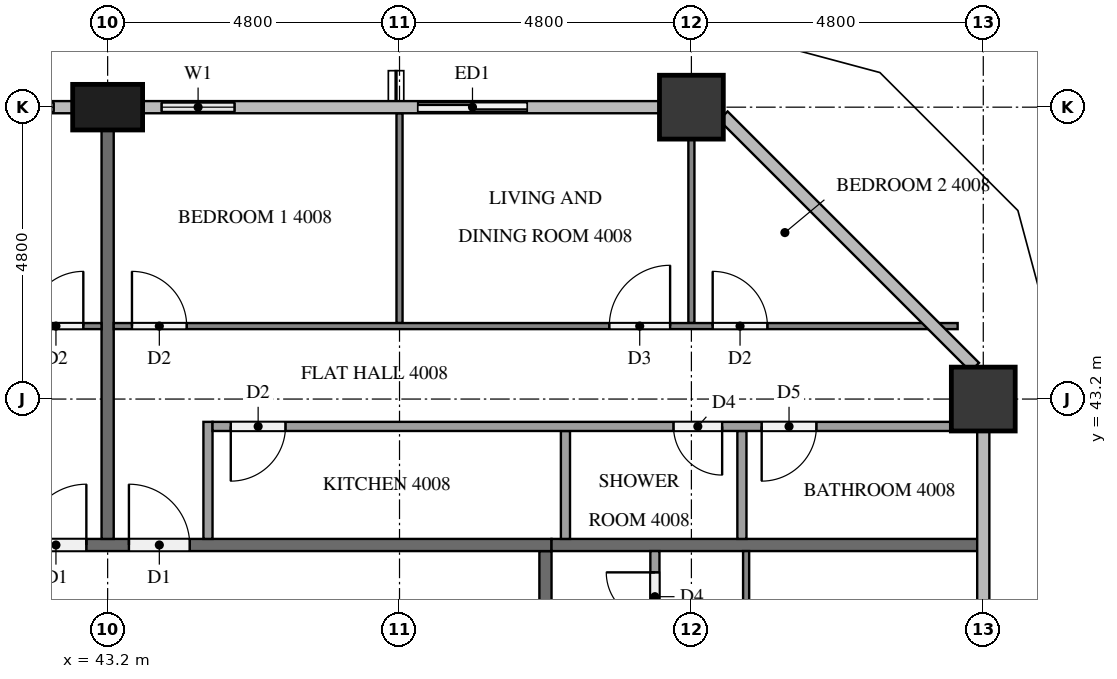
"""IFC4 building model, lengths in metres.
Left out: names, types, materials, properties, quantities, classifications, styles, units other than length and angle.
Written with IfcOpenShell. Run it as: python <this file> out.ifc"""

import sys

from ifc_helpers import new_model, si_unit, direction, frame, frame_2d, origin, origin_2d, place, context, subcontext, project, spatial, rectangle, extrude, element, fill, save


model = new_model("IFC4")
c1 = context("Model", 3, precision=1e-05, world=origin(), true_north=direction((0.0, 1.0)))
c2 = subcontext(c1, "Body", "Model", "MODEL_VIEW")
j1 = project(units=[si_unit("LENGTHUNIT", "METRE"), si_unit("PLANEANGLEUNIT", "RADIAN")], contexts=[c1])
p1 = place(None, origin())
s1 = spatial("IfcSite", under=j1, at=p1, CompositionType="ELEMENT")
p2 = place(p1, origin())
s2 = spatial("IfcBuilding", under=s1, at=p2, CompositionType="ELEMENT")
p3 = place(p2, frame((0.0, 0.0, 156.0)))
s3 = spatial("IfcBuildingStorey", under=s2, at=p3, CompositionType="ELEMENT", Elevation=156.0)
for number, where, z_axis, x_axis in (
    (1, (57.6, 43.2, 0.0), (0.0, 0.0, 1.0), (1.0, 0.0, 0.0)),
    (2, (52.8, 48.0, 0.0), (0.0, 0.0, 1.0), (1.0, 0.0, 0.0)),
):
    element("IfcColumn", number, at=place(p3, frame(where, z_axis=z_axis, x_axis=x_axis)), inside=s3, PredefinedType="COLUMN", context=c2, shape_type="SweptSolid", body=[
        extrude(rectangle(XDim=1.05, YDim=1.05, at=origin_2d()), origin(), (0.0, 0.0, 1.0), 3.2),
    ])
p4 = place(p3, frame((43.2, 48.0, 0.0), z_axis=(0.0, 0.0, 1.0), x_axis=(1.0, 0.0, 0.0)))
e3 = element("IfcColumn", 3, at=p4, inside=s3, PredefinedType="COLUMN", context=c2, shape_type="SweptSolid", body=[
    extrude(rectangle(XDim=1.15, YDim=0.75, at=origin_2d()), origin(), (0.0, 0.0, 1.0), 3.2),
])
p5 = place(p3, frame((50.4, 48.0, 0.0), z_axis=(0.0, 0.0, 1.0), x_axis=(-1.0, 0.0, 0.0)))
e4 = element("IfcWall", 4, at=p5, inside=s3, PredefinedType="SOLIDWALL", context=c2, shape_type="SweptSolid", body=[
    extrude(rectangle(XDim=2.4, YDim=0.15, at=frame_2d((1.2, 0.0))), origin(), (0.0, 0.0, 1.0), 3.2),
])
p6 = place(p5, frame((0.3, 0.0, 0.0)))
e5 = element("IfcOpeningElement", 5, at=p6, cuts=e4, PredefinedType="OPENING", context=c2, shape_type="SweptSolid", body=[
    extrude(rectangle(XDim=1.8, YDim=2.4, at=frame_2d((0.9, 1.2))), frame((0.0, 0.085, 0.0), z_axis=(0.0, -1.0, 0.0), x_axis=(1.0, 0.0, 0.0)), (0.0, 0.0, 1.0), 0.17),
])
p7 = place(p3, frame((45.6, 48.0, 0.0), z_axis=(0.0, 0.0, 1.0), x_axis=(-1.0, 0.0, 0.0)))
e6 = element("IfcWall", 6, at=p7, inside=s3, PredefinedType="SOLIDWALL", context=c2, shape_type="SweptSolid", body=[
    extrude(rectangle(XDim=1.825, YDim=0.15, at=frame_2d((0.913, 0.0))), origin(), (0.0, 0.0, 1.0), 3.2),
])
p8 = place(p7, frame((0.312, 0.0, 0.9)))
e7 = element("IfcOpeningElement", 7, at=p8, cuts=e6, PredefinedType="OPENING", context=c2, shape_type="SweptSolid", body=[
    extrude(rectangle(XDim=1.2, YDim=1.4, at=frame_2d((0.6, 0.7))), frame((0.0, 0.085, 0.0), z_axis=(0.0, -1.0, 0.0), x_axis=(1.0, 0.0, 0.0)), (0.0, 0.0, 1.0), 0.17),
])
p9 = place(p3, frame((42.625, 48.0, 0.0), z_axis=(0.0, 0.0, 1.0), x_axis=(-1.0, 0.0, 0.0)))
e8 = element("IfcWall", 8, at=p9, inside=s3, PredefinedType="SOLIDWALL", context=c2, shape_type="SweptSolid", body=[
    extrude(rectangle(XDim=1.825, YDim=0.15, at=frame_2d((0.913, 0.0))), origin(), (0.0, 0.0, 1.0), 3.2),
])
p10 = place(p9, frame((0.312, 0.0, 0.9)))
e9 = element("IfcOpeningElement", 9, at=p10, cuts=e8, PredefinedType="OPENING", context=c2, shape_type="SweptSolid", body=[
    extrude(rectangle(XDim=1.2, YDim=1.4, at=frame_2d((0.6, 0.7))), frame((0.0, 0.085, 0.0), z_axis=(0.0, -1.0, 0.0), x_axis=(1.0, 0.0, 0.0)), (0.0, 0.0, 1.0), 0.17),
])
p11 = place(p3, frame((50.4, 40.7, 0.0), z_axis=(0.0, 0.0, 1.0), x_axis=(0.0, -1.0, 0.0)))
e10 = element("IfcWall", 10, at=p11, inside=s3, PredefinedType="PARTITIONING", context=c2, shape_type="SweptSolid", body=[
    extrude(rectangle(XDim=28.6, YDim=0.2, at=frame_2d((14.3, 0.0))), origin(), (0.0, 0.0, 1.0), 3.2),
])
p12 = place(p11, frame((17.05, 0.0, 0.0)))
e11 = element("IfcOpeningElement", 11, at=p12, cuts=e10, PredefinedType="OPENING", context=c2, shape_type="SweptSolid", body=[
    extrude(rectangle(XDim=1.0, YDim=2.1, at=frame_2d((0.5, 1.05))), frame((0.0, 0.11, 0.0), z_axis=(0.0, -1.0, 0.0), x_axis=(1.0, 0.0, 0.0)), (0.0, 0.0, 1.0), 0.22),
])
p13 = place(p11, frame((15.35, 0.0, 0.0)))
e12 = element("IfcOpeningElement", 12, at=p13, cuts=e10, PredefinedType="OPENING", context=c2, shape_type="SweptSolid", body=[
    extrude(rectangle(XDim=1.0, YDim=2.1, at=frame_2d((0.5, 1.05))), frame((0.0, 0.11, 0.0), z_axis=(0.0, -1.0, 0.0), x_axis=(1.0, 0.0, 0.0)), (0.0, 0.0, 1.0), 0.22),
])
p14 = place(p11, frame((5.75, 0.0, 0.0)))
e13 = element("IfcOpeningElement", 13, at=p14, cuts=e10, PredefinedType="OPENING", context=c2, shape_type="SweptSolid", body=[
    extrude(rectangle(XDim=1.0, YDim=2.1, at=frame_2d((0.5, 1.05))), frame((0.0, 0.11, 0.0), z_axis=(0.0, -1.0, 0.0), x_axis=(1.0, 0.0, 0.0)), (0.0, 0.0, 1.0), 0.22),
])
p15 = place(p3, frame((11.9, 40.8, 0.0), z_axis=(0.0, 0.0, 1.0), x_axis=(1.0, 0.0, 0.0)))
e14 = element("IfcWall", 14, at=p15, inside=s3, PredefinedType="PARTITIONING", context=c2, shape_type="SweptSolid", body=[
    extrude(rectangle(XDim=38.6, YDim=0.2, at=frame_2d((19.3, 0.0))), origin(), (0.0, 0.0, 1.0), 3.2),
])
p16 = place(p15, frame((31.65, 0.0, 0.0)))
e15 = element("IfcOpeningElement", 15, at=p16, cuts=e14, PredefinedType="OPENING", context=c2, shape_type="SweptSolid", body=[
    extrude(rectangle(XDim=1.0, YDim=2.1, at=frame_2d((0.5, 1.05))), frame((0.0, 0.11, 0.0), z_axis=(0.0, -1.0, 0.0), x_axis=(1.0, 0.0, 0.0)), (0.0, 0.0, 1.0), 0.22),
])
p17 = place(p15, frame((29.95, 0.0, 0.0)))
e16 = element("IfcOpeningElement", 16, at=p17, cuts=e14, PredefinedType="OPENING", context=c2, shape_type="SweptSolid", body=[
    extrude(rectangle(XDim=1.0, YDim=2.1, at=frame_2d((0.5, 1.05))), frame((0.0, 0.11, 0.0), z_axis=(0.0, -1.0, 0.0), x_axis=(1.0, 0.0, 0.0)), (0.0, 0.0, 1.0), 0.22),
])
p18 = place(p15, frame((15.55, 0.0, 0.0)))
e17 = element("IfcOpeningElement", 17, at=p18, cuts=e14, PredefinedType="OPENING", context=c2, shape_type="SweptSolid", body=[
    extrude(rectangle(XDim=1.0, YDim=2.1, at=frame_2d((0.5, 1.05))), frame((0.0, 0.11, 0.0), z_axis=(0.0, -1.0, 0.0), x_axis=(1.0, 0.0, 0.0)), (0.0, 0.0, 1.0), 0.22),
])
p19 = place(p15, frame((1.15, 0.0, 0.0)))
e18 = element("IfcOpeningElement", 18, at=p19, cuts=e14, PredefinedType="OPENING", context=c2, shape_type="SweptSolid", body=[
    extrude(rectangle(XDim=1.0, YDim=2.1, at=frame_2d((0.5, 1.05))), frame((0.0, 0.11, 0.0), z_axis=(0.0, -1.0, 0.0), x_axis=(1.0, 0.0, 0.0)), (0.0, 0.0, 1.0), 0.22),
])
p20 = place(p3, frame((50.5, 40.8, 0.0), z_axis=(0.0, 0.0, 1.0), x_axis=(1.0, 0.0, 0.0)))
e19 = element("IfcWall", 19, at=p20, inside=s3, PredefinedType="PARTITIONING", context=c2, shape_type="SweptSolid", body=[
    extrude(rectangle(XDim=7.0, YDim=0.2, at=frame_2d((3.5, 0.0))), origin(), (0.0, 0.0, 1.0), 3.2),
])
p21 = place(p3, frame((43.2, 47.625, 0.0), z_axis=(0.0, 0.0, 1.0), x_axis=(0.0, -1.0, 0.0)))
e20 = element("IfcWall", 20, at=p21, inside=s3, PredefinedType="PARTITIONING", context=c2, shape_type="SweptSolid", body=[
    extrude(rectangle(XDim=6.725, YDim=0.2, at=frame_2d((3.363, 0.0))), origin(), (0.0, 0.0, 1.0), 3.2),
])
p22 = place(p3, frame((53.7, 40.7, 0.0), z_axis=(0.0, 0.0, 1.0), x_axis=(0.0, -1.0, 0.0)))
e21 = element("IfcWall", 21, at=p22, inside=s3, PredefinedType="PARTITIONING", context=c2, shape_type="SweptSolid", body=[
    extrude(rectangle(XDim=7.0, YDim=0.1, at=frame_2d((3.5, 0.0))), origin(), (0.0, 0.0, 1.0), 3.2),
])
p23 = place(p22, frame((5.7, 0.0, 0.0)))
e22 = element("IfcOpeningElement", 22, at=p23, cuts=e21, PredefinedType="OPENING", context=c2, shape_type="SweptSolid", body=[
    extrude(rectangle(XDim=1.0, YDim=2.1, at=frame_2d((0.5, 1.05))), frame((0.0, 0.06, 0.0), z_axis=(0.0, -1.0, 0.0), x_axis=(1.0, 0.0, 0.0)), (0.0, 0.0, 1.0), 0.12),
])
p24 = place(p3, frame((52.2, 35.325, 0.0), z_axis=(0.0, 0.0, 1.0), x_axis=(0.0, 1.0, 0.0)))
e23 = element("IfcWall", 23, at=p24, inside=s3, PredefinedType="PARTITIONING", context=c2, shape_type="SweptSolid", body=[
    extrude(rectangle(XDim=5.375, YDim=0.15, at=frame_2d((2.688, 0.0))), origin(), (0.0, 0.0, 1.0), 3.2),
])
p25 = place(p24, frame((0.3, 0.0, 0.0)))
e24 = element("IfcOpeningElement", 24, at=p25, cuts=e23, PredefinedType="OPENING", context=c2, shape_type="SweptSolid", body=[
    extrude(rectangle(XDim=0.9, YDim=2.1, at=frame_2d((0.45, 1.05))), frame((0.0, 0.085, 0.0), z_axis=(0.0, -1.0, 0.0), x_axis=(1.0, 0.0, 0.0)), (0.0, 0.0, 1.0), 0.17),
])
p26 = place(p24, frame((4.225, 0.0, 0.0)))
e25 = element("IfcOpeningElement", 25, at=p26, cuts=e23, PredefinedType="OPENING", context=c2, shape_type="SweptSolid", body=[
    extrude(rectangle(XDim=0.8, YDim=2.1, at=frame_2d((0.4, 1.05))), frame((0.0, 0.085, 0.0), z_axis=(0.0, -1.0, 0.0), x_axis=(1.0, 0.0, 0.0)), (0.0, 0.0, 1.0), 0.17),
])
p27 = place(p3, frame((48.0, 44.45, 0.0), z_axis=(0.0, 0.0, 1.0), x_axis=(0.0, 1.0, 0.0)))
e26 = element("IfcWall", 26, at=p27, inside=s3, PredefinedType="PARTITIONING", context=c2, shape_type="SweptSolid", body=[
    extrude(rectangle(XDim=3.45, YDim=0.1, at=frame_2d((1.725, 0.0))), origin(), (0.0, 0.0, 1.0), 3.2),
])
p28 = place(p3, frame((52.8, 44.45, 0.0), z_axis=(0.0, 0.0, 1.0), x_axis=(0.0, 1.0, 0.0)))
e27 = element("IfcWall", 27, at=p28, inside=s3, PredefinedType="PARTITIONING", context=c2, shape_type="SweptSolid", body=[
    extrude(rectangle(XDim=3.025, YDim=0.1, at=frame_2d((1.513, 0.0))), origin(), (0.0, 0.0, 1.0), 3.2),
])
p29 = place(p3, frame((43.3, 44.4, 0.0), z_axis=(0.0, 0.0, 1.0), x_axis=(1.0, 0.0, 0.0)))
e28 = element("IfcWall", 28, at=p29, inside=s3, PredefinedType="PARTITIONING", context=c2, shape_type="SweptSolid", body=[
    extrude(rectangle(XDim=13.878, YDim=0.1, at=frame_2d((6.939, 0.0))), origin(), (0.0, 0.0, 1.0), 3.2),
])
p30 = place(p29, frame((0.3, 0.0, 0.0)))
e29 = element("IfcOpeningElement", 29, at=p30, cuts=e28, PredefinedType="OPENING", context=c2, shape_type="SweptSolid", body=[
    extrude(rectangle(XDim=0.9, YDim=2.1, at=frame_2d((0.45, 1.05))), frame((0.0, 0.06, 0.0), z_axis=(0.0, -1.0, 0.0), x_axis=(1.0, 0.0, 0.0)), (0.0, 0.0, 1.0), 0.12),
])
p31 = place(p29, frame((8.15, 0.0, 0.0)))
e30 = element("IfcOpeningElement", 30, at=p31, cuts=e28, PredefinedType="OPENING", context=c2, shape_type="SweptSolid", body=[
    extrude(rectangle(XDim=1.0, YDim=2.1, at=frame_2d((0.5, 1.05))), frame((0.0, 0.06, 0.0), z_axis=(0.0, -1.0, 0.0), x_axis=(1.0, 0.0, 0.0)), (0.0, 0.0, 1.0), 0.12),
])
p32 = place(p29, frame((9.85, 0.0, 0.0)))
e31 = element("IfcOpeningElement", 31, at=p32, cuts=e28, PredefinedType="OPENING", context=c2, shape_type="SweptSolid", body=[
    extrude(rectangle(XDim=0.9, YDim=2.1, at=frame_2d((0.45, 1.05))), frame((0.0, 0.06, 0.0), z_axis=(0.0, -1.0, 0.0), x_axis=(1.0, 0.0, 0.0)), (0.0, 0.0, 1.0), 0.12),
])
for number, where, z_axis, x_axis in (
    (32, (50.729, 40.9, 0.0), (0.0, 0.0, 1.0), (0.0, 1.0, 0.0)),
    (33, (53.631, 40.9, 0.0), (0.0, 0.0, 1.0), (0.0, 1.0, 0.0)),
):
    element("IfcWall", number, at=place(p3, frame(where, z_axis=z_axis, x_axis=x_axis)), inside=s3, PredefinedType="PARTITIONING", context=c2, shape_type="SweptSolid", body=[
        extrude(rectangle(XDim=1.775, YDim=0.15, at=frame_2d((0.888, 0.0))), origin(), (0.0, 0.0, 1.0), 3.2),
    ])
p33 = place(p3, frame((44.85, 40.9, 0.0), z_axis=(0.0, 0.0, 1.0), x_axis=(0.0, 1.0, 0.0)))
e34 = element("IfcWall", 34, at=p33, inside=s3, PredefinedType="PARTITIONING", context=c2, shape_type="SweptSolid", body=[
    extrude(rectangle(XDim=1.925, YDim=0.15, at=frame_2d((0.962, 0.0))), origin(), (0.0, 0.0, 1.0), 3.2),
])
p34 = place(p3, frame((57.075, 42.75, 0.0), z_axis=(0.0, 0.0, 1.0), x_axis=(-1.0, 0.0, 0.0)))
e35 = element("IfcWall", 35, at=p34, inside=s3, PredefinedType="PARTITIONING", context=c2, shape_type="SweptSolid", body=[
    extrude(rectangle(XDim=12.15, YDim=0.15, at=frame_2d((6.075, 0.0))), origin(), (0.0, 0.0, 1.0), 3.2),
])
p35 = place(p34, frame((10.95, 0.0, 0.0)))
e36 = element("IfcOpeningElement", 36, at=p35, cuts=e35, PredefinedType="OPENING", context=c2, shape_type="SweptSolid", body=[
    extrude(rectangle(XDim=0.9, YDim=2.1, at=frame_2d((0.45, 1.05))), frame((0.0, 0.085, 0.0), z_axis=(0.0, -1.0, 0.0), x_axis=(1.0, 0.0, 0.0)), (0.0, 0.0, 1.0), 0.17),
])
p36 = place(p34, frame((3.769, 0.0, 0.0)))
e37 = element("IfcOpeningElement", 37, at=p36, cuts=e35, PredefinedType="OPENING", context=c2, shape_type="SweptSolid", body=[
    extrude(rectangle(XDim=0.8, YDim=2.1, at=frame_2d((0.4, 1.05))), frame((0.0, 0.085, 0.0), z_axis=(0.0, -1.0, 0.0), x_axis=(1.0, 0.0, 0.0)), (0.0, 0.0, 1.0), 0.17),
])
p37 = place(p34, frame((2.219, 0.0, 0.0)))
e38 = element("IfcOpeningElement", 38, at=p37, cuts=e35, PredefinedType="OPENING", context=c2, shape_type="SweptSolid", body=[
    extrude(rectangle(XDim=0.9, YDim=2.1, at=frame_2d((0.45, 1.05))), frame((0.0, 0.085, 0.0), z_axis=(0.0, -1.0, 0.0), x_axis=(1.0, 0.0, 0.0)), (0.0, 0.0, 1.0), 0.17),
])
p38 = place(p3, frame((28.9, 44.4, 0.0), z_axis=(0.0, 0.0, 1.0), x_axis=(1.0, 0.0, 0.0)))
e39 = element("IfcWall", 39, at=p38, inside=s3, PredefinedType="PARTITIONING", context=c2, shape_type="SweptSolid", body=[
    extrude(rectangle(XDim=14.2, YDim=0.1, at=frame_2d((7.1, 0.0))), origin(), (0.0, 0.0, 1.0), 3.2),
])
p39 = place(p38, frame((13.0, 0.0, 0.0)))
e40 = element("IfcOpeningElement", 40, at=p39, cuts=e39, PredefinedType="OPENING", context=c2, shape_type="SweptSolid", body=[
    extrude(rectangle(XDim=0.9, YDim=2.1, at=frame_2d((0.45, 1.05))), frame((0.0, 0.06, 0.0), z_axis=(0.0, -1.0, 0.0), x_axis=(1.0, 0.0, 0.0)), (0.0, 0.0, 1.0), 0.12),
])
p40 = place(p38, frame((5.05, 0.0, 0.0)))
e41 = element("IfcOpeningElement", 41, at=p40, cuts=e39, PredefinedType="OPENING", context=c2, shape_type="SweptSolid", body=[
    extrude(rectangle(XDim=0.9, YDim=2.1, at=frame_2d((0.45, 1.05))), frame((0.0, 0.06, 0.0), z_axis=(0.0, -1.0, 0.0), x_axis=(1.0, 0.0, 0.0)), (0.0, 0.0, 1.0), 0.12),
])
p41 = place(p38, frame((3.35, 0.0, 0.0)))
e42 = element("IfcOpeningElement", 42, at=p41, cuts=e39, PredefinedType="OPENING", context=c2, shape_type="SweptSolid", body=[
    extrude(rectangle(XDim=1.0, YDim=2.1, at=frame_2d((0.5, 1.05))), frame((0.0, 0.06, 0.0), z_axis=(0.0, -1.0, 0.0), x_axis=(1.0, 0.0, 0.0)), (0.0, 0.0, 1.0), 0.12),
])
p42 = place(p6, origin())
e43 = element("IfcDoor", 43, at=p42, inside=s3, OperationType="SLIDING_TO_RIGHT", PredefinedType="DOOR", context=c2, shape_type="SweptSolid", body=[
    extrude(rectangle(XDim=1.8, YDim=2.4, at=frame_2d((0.9, 1.2))), frame((0.0, 0.025, 0.0), z_axis=(0.0, -1.0, 0.0), x_axis=(1.0, 0.0, 0.0)), (0.0, 0.0, 1.0), 0.05),
])
fill(e5, e43)
p43 = place(p8, origin())
e44 = element("IfcWindow", 44, at=p43, inside=s3, PartitioningType="SINGLE_PANEL", PredefinedType="WINDOW", context=c2, shape_type="SweptSolid", body=[
    extrude(rectangle(XDim=1.2, YDim=1.4, at=frame_2d((0.6, 0.7))), frame((0.0, 0.03, 0.0), z_axis=(0.0, -1.0, 0.0), x_axis=(1.0, 0.0, 0.0)), (0.0, 0.0, 1.0), 0.06),
])
fill(e7, e44)
p44 = place(p10, origin())
e45 = element("IfcWindow", 45, at=p44, inside=s3, PartitioningType="SINGLE_PANEL", PredefinedType="WINDOW", context=c2, shape_type="SweptSolid", body=[
    extrude(rectangle(XDim=1.2, YDim=1.4, at=frame_2d((0.6, 0.7))), frame((0.0, 0.03, 0.0), z_axis=(0.0, -1.0, 0.0), x_axis=(1.0, 0.0, 0.0)), (0.0, 0.0, 1.0), 0.06),
])
fill(e9, e45)
p45 = place(p16, origin())
e46 = element("IfcDoor", 46, at=p45, inside=s3, OperationType="SINGLE_SWING_LEFT", PredefinedType="DOOR", context=c2, shape_type="SweptSolid", body=[
    extrude(rectangle(XDim=1.0, YDim=2.1, at=frame_2d((0.5, 1.05))), frame((0.0, 0.025, 0.0), z_axis=(0.0, -1.0, 0.0), x_axis=(1.0, 0.0, 0.0)), (0.0, 0.0, 1.0), 0.05),
])
fill(e15, e46)
p46 = place(p17, origin())
e47 = element("IfcDoor", 47, at=p46, inside=s3, OperationType="SINGLE_SWING_RIGHT", PredefinedType="DOOR", context=c2, shape_type="SweptSolid", body=[
    extrude(rectangle(XDim=1.0, YDim=2.1, at=frame_2d((0.5, 1.05))), frame((0.0, 0.025, 0.0), z_axis=(0.0, -1.0, 0.0), x_axis=(1.0, 0.0, 0.0)), (0.0, 0.0, 1.0), 0.05),
])
fill(e16, e47)
p47 = place(p26, origin())
e48 = element("IfcDoor", 48, at=p47, inside=s3, OperationType="SINGLE_SWING_RIGHT", PredefinedType="DOOR", context=c2, shape_type="SweptSolid", body=[
    extrude(rectangle(XDim=0.8, YDim=2.1, at=frame_2d((0.4, 1.05))), frame((0.0, 0.025, 0.0), z_axis=(0.0, -1.0, 0.0), x_axis=(1.0, 0.0, 0.0)), (0.0, 0.0, 1.0), 0.05),
])
fill(e25, e48)
p48 = place(p30, origin())
e49 = element("IfcDoor", 49, at=p48, inside=s3, OperationType="SINGLE_SWING_LEFT", PredefinedType="DOOR", context=c2, shape_type="SweptSolid", body=[
    extrude(rectangle(XDim=0.9, YDim=2.1, at=frame_2d((0.45, 1.05))), frame((0.0, 0.025, 0.0), z_axis=(0.0, -1.0, 0.0), x_axis=(1.0, 0.0, 0.0)), (0.0, 0.0, 1.0), 0.05),
])
fill(e29, e49)
p49 = place(p31, origin())
e50 = element("IfcDoor", 50, at=p49, inside=s3, OperationType="SINGLE_SWING_RIGHT", PredefinedType="DOOR", context=c2, shape_type="SweptSolid", body=[
    extrude(rectangle(XDim=1.0, YDim=2.1, at=frame_2d((0.5, 1.05))), frame((0.0, 0.025, 0.0), z_axis=(0.0, -1.0, 0.0), x_axis=(1.0, 0.0, 0.0)), (0.0, 0.0, 1.0), 0.05),
])
fill(e30, e50)
p50 = place(p32, origin())
e51 = element("IfcDoor", 51, at=p50, inside=s3, OperationType="SINGLE_SWING_LEFT", PredefinedType="DOOR", context=c2, shape_type="SweptSolid", body=[
    extrude(rectangle(XDim=0.9, YDim=2.1, at=frame_2d((0.45, 1.05))), frame((0.0, 0.025, 0.0), z_axis=(0.0, -1.0, 0.0), x_axis=(1.0, 0.0, 0.0)), (0.0, 0.0, 1.0), 0.05),
])
fill(e31, e51)
p51 = place(p35, origin())
e52 = element("IfcDoor", 52, at=p51, inside=s3, OperationType="SINGLE_SWING_RIGHT", PredefinedType="DOOR", context=c2, shape_type="SweptSolid", body=[
    extrude(rectangle(XDim=0.9, YDim=2.1, at=frame_2d((0.45, 1.05))), frame((0.0, 0.025, 0.0), z_axis=(0.0, -1.0, 0.0), x_axis=(1.0, 0.0, 0.0)), (0.0, 0.0, 1.0), 0.05),
])
fill(e36, e52)
p52 = place(p36, origin())
e53 = element("IfcDoor", 53, at=p52, inside=s3, OperationType="SINGLE_SWING_LEFT", PredefinedType="DOOR", context=c2, shape_type="SweptSolid", body=[
    extrude(rectangle(XDim=0.8, YDim=2.1, at=frame_2d((0.4, 1.05))), frame((0.0, 0.025, 0.0), z_axis=(0.0, -1.0, 0.0), x_axis=(1.0, 0.0, 0.0)), (0.0, 0.0, 1.0), 0.05),
])
fill(e37, e53)
p53 = place(p37, origin())
e54 = element("IfcDoor", 54, at=p53, inside=s3, OperationType="SINGLE_SWING_RIGHT", PredefinedType="DOOR", context=c2, shape_type="SweptSolid", body=[
    extrude(rectangle(XDim=0.9, YDim=2.1, at=frame_2d((0.45, 1.05))), frame((0.0, 0.025, 0.0), z_axis=(0.0, -1.0, 0.0), x_axis=(1.0, 0.0, 0.0)), (0.0, 0.0, 1.0), 0.05),
])
fill(e38, e54)
p54 = place(p39, origin())
e55 = element("IfcDoor", 55, at=p54, inside=s3, OperationType="SINGLE_SWING_RIGHT", PredefinedType="DOOR", context=c2, shape_type="SweptSolid", body=[
    extrude(rectangle(XDim=0.9, YDim=2.1, at=frame_2d((0.45, 1.05))), frame((0.0, 0.025, 0.0), z_axis=(0.0, -1.0, 0.0), x_axis=(1.0, 0.0, 0.0)), (0.0, 0.0, 1.0), 0.05),
])
fill(e40, e55)
save(model, sys.argv[1])
